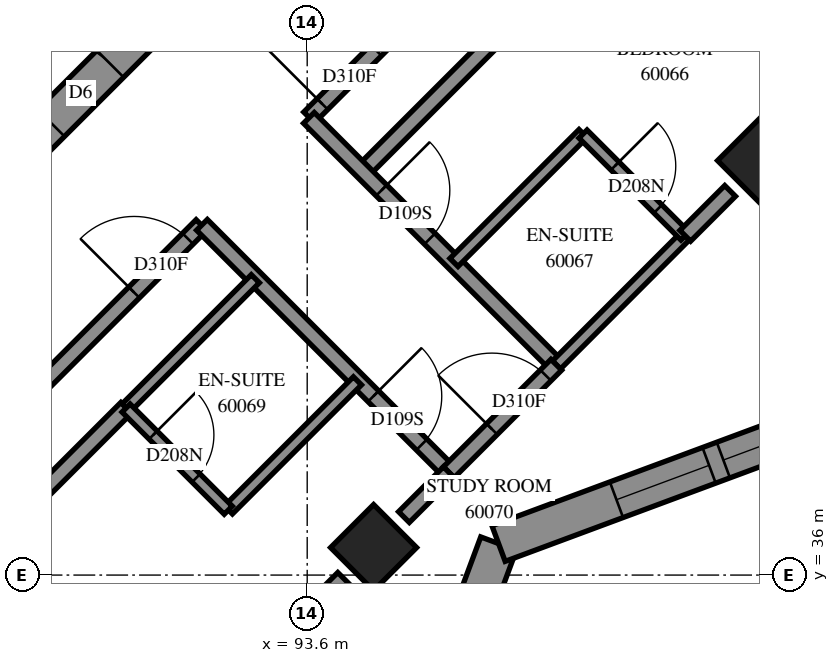
"""IFC4 building model, lengths in metres.
Left out: names, types, materials, properties, quantities, classifications, styles, units other than length and angle.
Written with IfcOpenShell. Run it as: python <this file> out.ifc"""

import sys

from ifc_helpers import new_model, si_unit, direction, frame, frame_2d, origin, origin_2d, place, context, subcontext, project, spatial, polyline, rectangle, outline, extrude, element, fill, save


model = new_model("IFC4")
c1 = context("Model", 3, precision=1e-05, world=origin(), true_north=direction((0.0, 1.0)))
c2 = subcontext(c1, "Body", "Model", "MODEL_VIEW")
j1 = project(units=[si_unit("LENGTHUNIT", "METRE"), si_unit("PLANEANGLEUNIT", "RADIAN")], contexts=[c1])
p1 = place(None, origin())
s1 = spatial("IfcSite", under=j1, at=p1, CompositionType="ELEMENT")
p2 = place(p1, origin())
s2 = spatial("IfcBuilding", under=s1, at=p2, CompositionType="ELEMENT")
p3 = place(p2, frame((0.0, 0.0, 220.2)))
s3 = spatial("IfcBuildingStorey", under=s2, at=p3, CompositionType="ELEMENT", Elevation=220.2)
for number, where, z_axis, x_axis in (
    (1, (99.565, 41.453, 0.0), (0.0, 0.0, 1.0), (0.707, -0.707, 0.0)),
    (2, (94.474, 36.362, 0.0), (0.0, 0.0, 1.0), (0.707, -0.707, 0.0)),
):
    element("IfcColumn", number, at=place(p3, frame(where, z_axis=z_axis, x_axis=x_axis)), inside=s3, PredefinedType="COLUMN", context=c2, shape_type="SweptSolid", body=[
        extrude(rectangle(XDim=0.8, YDim=0.8, at=origin_2d()), origin(), (0.0, 0.0, 1.0), 3.1),
    ])
p4 = place(p3, frame((87.013, 38.731, -0.3), z_axis=(0.0, 0.0, 1.0), x_axis=(0.7071067812, 0.7071067812, 0.0)))
e3 = element("IfcWall", 3, at=p4, inside=s3, PredefinedType="SHEAR", context=c2, shape_type="SweptSolid", body=[
    extrude(rectangle(XDim=14.4, YDim=0.5, at=frame_2d((7.2, 0.0))), origin(), (0.0, 0.0, 1.0), 2.7),
])
p5 = place(p4, frame((4.55, 0.0, 0.3)))
e4 = element("IfcOpeningElement", 4, at=p5, cuts=e3, PredefinedType="OPENING", context=c2, shape_type="SweptSolid", body=[
    extrude(rectangle(XDim=1.1, YDim=2.1, at=frame_2d((0.55, 1.05))), frame((0.0, 0.26, 0.0), z_axis=(0.0, -1.0, 0.0), x_axis=(1.0, 0.0, 0.0)), (0.0, 0.0, 1.0), 0.52),
])
p6 = place(p4, frame((11.35, 0.0, 0.3)))
e5 = element("IfcOpeningElement", 5, at=p6, cuts=e3, PredefinedType="OPENING", context=c2, shape_type="SweptSolid", body=[
    extrude(rectangle(XDim=1.1, YDim=2.1, at=frame_2d((0.55, 1.05))), frame((0.0, 0.26, 0.0), z_axis=(0.0, -1.0, 0.0), x_axis=(1.0, 0.0, 0.0)), (0.0, 0.0, 1.0), 0.52),
])
p7 = place(p3, frame((94.281, 31.47, 0.0), z_axis=(0.0, 0.0, 1.0), x_axis=(0.3481903374, 0.9374238577, 0.0)))
e6 = element("IfcWall", 6, at=p7, inside=s3, PredefinedType="SOLIDWALL", context=c2, shape_type="SweptSolid", body=[
    extrude(outline(polyline([(-0.12, -0.25), (5.16, -0.25), (5.39, 0.25), (0.12, 0.25), (-0.12, -0.25)])), origin(), (0.0, 0.0, 1.0), 3.1),
])
p8 = place(p7, frame((1.512, 0.0, 0.45)))
e7 = element("IfcOpeningElement", 7, at=p8, cuts=e6, PredefinedType="OPENING", context=c2, shape_type="SweptSolid", body=[
    extrude(rectangle(XDim=1.3, YDim=2.5, at=frame_2d((0.65, 1.25))), frame((0.0, 0.26, 0.0), z_axis=(0.0, -1.0, 0.0), x_axis=(1.0, 0.0, 0.0)), (0.0, 0.0, 1.0), 0.52),
])
p9 = place(p7, frame((3.012, 0.0, 0.45)))
e8 = element("IfcOpeningElement", 8, at=p9, cuts=e6, PredefinedType="OPENING", context=c2, shape_type="SweptSolid", body=[
    extrude(rectangle(XDim=1.3, YDim=2.5, at=frame_2d((0.65, 1.25))), frame((0.0, 0.26, 0.0), z_axis=(0.0, -1.0, 0.0), x_axis=(1.0, 0.0, 0.0)), (0.0, 0.0, 1.0), 0.52),
])
p10 = place(p3, frame((96.118, 36.415, 0.0), z_axis=(0.0, 0.0, 1.0), x_axis=(0.9374238577, 0.3481903374, 0.0)))
e9 = element("IfcWall", 9, at=p10, inside=s3, PredefinedType="SOLIDWALL", context=c2, shape_type="SweptSolid", body=[
    extrude(outline(polyline([(0.115, -0.25), (5.395, -0.25), (5.155, 0.25), (-0.115, 0.25), (0.115, -0.25)])), origin(), (0.0, 0.0, 1.0), 3.1),
])
p11 = place(p10, frame((1.655, 0.0, 0.45)))
e10 = element("IfcOpeningElement", 10, at=p11, cuts=e9, PredefinedType="OPENING", context=c2, shape_type="SweptSolid", body=[
    extrude(rectangle(XDim=1.3, YDim=2.5, at=frame_2d((0.65, 1.25))), frame((0.0, 0.26, 0.0), z_axis=(0.0, -1.0, 0.0), x_axis=(1.0, 0.0, 0.0)), (0.0, 0.0, 1.0), 0.52),
])
p12 = place(p10, frame((3.155, 0.0, 0.45)))
e11 = element("IfcOpeningElement", 11, at=p12, cuts=e9, PredefinedType="OPENING", context=c2, shape_type="SweptSolid", body=[
    extrude(rectangle(XDim=1.3, YDim=2.5, at=frame_2d((0.65, 1.25))), frame((0.0, 0.26, 0.0), z_axis=(0.0, -1.0, 0.0), x_axis=(1.0, 0.0, 0.0)), (0.0, 0.0, 1.0), 0.52),
])
p13 = place(p3, frame((93.625, 42.021, 0.0), z_axis=(0.0, 0.0, 1.0), x_axis=(0.7071067812, 0.7071067812, 0.0)))
e12 = element("IfcWall", 12, at=p13, inside=s3, PredefinedType="PARTITIONING", context=c2, shape_type="SweptSolid", body=[
    extrude(rectangle(XDim=9.998, YDim=0.2, at=frame_2d((4.999, 0.0))), origin(), (0.0, 0.0, 1.0), 3.1),
])
p14 = place(p13, frame((0.248, 0.0, 0.0)))
e13 = element("IfcOpeningElement", 13, at=p14, cuts=e12, PredefinedType="OPENING", context=c2, shape_type="SweptSolid", body=[
    extrude(rectangle(XDim=1.0, YDim=2.1, at=frame_2d((0.5, 1.05))), frame((0.0, 0.11, 0.0), z_axis=(0.0, -1.0, 0.0), x_axis=(1.0, 0.0, 0.0)), (0.0, 0.0, 1.0), 0.22),
])
p15 = place(p3, frame((85.016, 31.997, 0.0), z_axis=(0.0, 0.0, 1.0), x_axis=(0.7071067812, 0.7071067812, 0.0)))
e14 = element("IfcWall", 14, at=p15, inside=s3, PredefinedType="PARTITIONING", context=c2, shape_type="SweptSolid", body=[
    extrude(rectangle(XDim=8.773, YDim=0.2, at=frame_2d((4.387, 0.0))), origin(), (0.0, 0.0, 1.0), 3.1),
])
p16 = place(p3, frame((86.835, 35.231, 0.0), z_axis=(0.0, 0.0, 1.0), x_axis=(0.7071067812, 0.7071067812, 0.0)))
e15 = element("IfcWall", 15, at=p16, inside=s3, PredefinedType="PARTITIONING", context=c2, shape_type="SweptSolid", body=[
    extrude(rectangle(XDim=7.6, YDim=0.2, at=frame_2d((3.8, 0.0))), origin(), (0.0, 0.0, 1.0), 3.1),
])
p17 = place(p16, frame((6.346, 0.0, 0.0)))
e16 = element("IfcOpeningElement", 16, at=p17, cuts=e15, PredefinedType="OPENING", context=c2, shape_type="SweptSolid", body=[
    extrude(rectangle(XDim=1.0, YDim=2.1, at=frame_2d((0.5, 1.05))), frame((0.0, 0.11, 0.0), z_axis=(0.0, -1.0, 0.0), x_axis=(1.0, 0.0, 0.0)), (0.0, 0.0, 1.0), 0.22),
])
p18 = place(p3, frame((94.331, 41.313, 0.0), z_axis=(0.0, 0.0, 1.0), x_axis=(0.7072516979, 0.7069618347, 0.0)))
e17 = element("IfcWall", 17, at=p18, inside=s3, PredefinedType="PARTITIONING", context=c2, shape_type="SweptSolid", body=[
    extrude(rectangle(XDim=6.9, YDim=0.2, at=frame_2d((3.45, 0.0))), origin(), (0.0, 0.0, 1.0), 3.1),
])
p19 = place(p3, frame((89.781, 31.671, 0.0), z_axis=(0.0, 0.0, 1.0), x_axis=(0.7071067812, 0.7071067812, 0.0)))
e18 = element("IfcWall", 18, at=p19, inside=s3, PredefinedType="PARTITIONING", context=c2, shape_type="SweptSolid", body=[
    extrude(rectangle(XDim=6.07, YDim=0.2, at=frame_2d((3.035, 0.0))), origin(), (0.0, 0.0, 1.0), 2.6),
])
p20 = place(p3, frame((93.623, 42.015, 0.0), z_axis=(0.0, 0.0, 1.0), x_axis=(0.7071067812, -0.7071067812, 0.0)))
e19 = element("IfcWall", 19, at=p20, inside=s3, PredefinedType="PARTITIONING", context=c2, shape_type="SweptSolid", body=[
    extrude(rectangle(XDim=4.599, YDim=0.2, at=frame_2d((2.3, 0.0))), origin(), (0.0, 0.0, 1.0), 3.1),
])
p21 = place(p20, frame((1.349, 0.0, 0.0)))
e20 = element("IfcOpeningElement", 20, at=p21, cuts=e19, PredefinedType="OPENING", context=c2, shape_type="SweptSolid", body=[
    extrude(rectangle(XDim=0.9, YDim=2.1, at=frame_2d((0.45, 1.05))), frame((0.0, 0.11, 0.0), z_axis=(0.0, -1.0, 0.0), x_axis=(1.0, 0.0, 0.0)), (0.0, 0.0, 1.0), 0.22),
])
p22 = place(p3, frame((92.216, 40.608, 0.0), z_axis=(0.0, 0.0, 1.0), x_axis=(0.7071067812, -0.7071067812, 0.0)))
e21 = element("IfcWall", 21, at=p22, inside=s3, PredefinedType="PARTITIONING", context=c2, shape_type="SweptSolid", body=[
    extrude(rectangle(XDim=4.599, YDim=0.2, at=frame_2d((2.3, 0.0))), origin(), (0.0, 0.0, 1.0), 3.1),
])
p23 = place(p22, frame((3.189, 0.0, 0.0)))
e22 = element("IfcOpeningElement", 22, at=p23, cuts=e21, PredefinedType="OPENING", context=c2, shape_type="SweptSolid", body=[
    extrude(rectangle(XDim=0.9, YDim=2.1, at=frame_2d((0.45, 1.05))), frame((0.0, 0.11, 0.0), z_axis=(0.0, -1.0, 0.0), x_axis=(1.0, 0.0, 0.0)), (0.0, 0.0, 1.0), 0.22),
])
for number, where, z_axis, x_axis in (
    (23, (92.563, 36.857, 0.0), (0.0, 0.0, 1.0), (0.707, 0.707, 0.0)),
    (24, (91.219, 38.201, 0.0), (0.0, 0.0, 1.0), (0.707, 0.707, 0.0)),
):
    element("IfcWall", number, at=place(p3, frame(where, z_axis=z_axis, x_axis=x_axis)), inside=s3, PredefinedType="PARTITIONING", context=c2, shape_type="SweptSolid", body=[
        extrude(rectangle(XDim=2.401, YDim=0.15, at=frame_2d((1.201, 0.0))), origin(), (0.0, 0.0, 1.0), 3.1),
    ])
p24 = place(p3, frame((96.879, 38.764, 0.0), z_axis=(0.0, 0.0, 1.0), x_axis=(0.706689978, 0.7075233388, 0.0)))
e25 = element("IfcWall", 25, at=p24, inside=s3, PredefinedType="PARTITIONING", context=c2, shape_type="SweptSolid", body=[
    extrude(rectangle(XDim=2.4, YDim=0.15, at=frame_2d((1.2, 0.0))), origin(), (0.0, 0.0, 1.0), 2.6),
])
p25 = place(p3, frame((95.531, 40.113, 0.0), z_axis=(0.0, 0.0, 1.0), x_axis=(0.7075233388, 0.706689978, 0.0)))
e26 = element("IfcWall", 26, at=p25, inside=s3, PredefinedType="PARTITIONING", context=c2, shape_type="SweptSolid", body=[
    extrude(rectangle(XDim=2.4, YDim=0.15, at=frame_2d((1.2, 0.0))), origin(), (0.0, 0.0, 1.0), 3.1),
])
p26 = place(p3, frame((95.463, 37.353, 0.0), z_axis=(0.0, 0.0, 1.0), x_axis=(0.7071067812, 0.7071067812, 0.0)))
e27 = element("IfcWall", 27, at=p26, inside=s3, PredefinedType="PARTITIONING", context=c2, shape_type="SweptSolid", body=[
    extrude(rectangle(XDim=2.0, YDim=0.2, at=frame_2d((1.0, 0.0))), origin(), (0.0, 0.0, 1.0), 2.6),
])
p27 = place(p26, frame((0.802, 0.0, 0.0)))
e28 = element("IfcOpeningElement", 28, at=p27, cuts=e27, PredefinedType="OPENING", context=c2, shape_type="SweptSolid", body=[
    extrude(rectangle(XDim=1.0, YDim=2.1, at=frame_2d((0.5, 1.05))), frame((0.0, 0.11, 0.0), z_axis=(0.0, -1.0, 0.0), x_axis=(1.0, 0.0, 0.0)), (0.0, 0.0, 1.0), 0.22),
])
p28 = place(p3, frame((91.217, 38.197, 0.0), z_axis=(0.0, 0.0, 1.0), x_axis=(0.7071067812, -0.7071067812, 0.0)))
e29 = element("IfcWall", 29, at=p28, inside=s3, PredefinedType="PARTITIONING", context=c2, shape_type="SweptSolid", body=[
    extrude(rectangle(XDim=1.901, YDim=0.15, at=frame_2d((0.95, 0.0))), origin(), (0.0, 0.0, 1.0), 3.1),
])
p29 = place(p28, frame((0.502, 0.0, 0.0)))
e30 = element("IfcOpeningElement", 30, at=p29, cuts=e29, PredefinedType="OPENING", context=c2, shape_type="SweptSolid", body=[
    extrude(rectangle(XDim=0.8, YDim=2.1, at=frame_2d((0.4, 1.05))), frame((0.0, 0.085, 0.0), z_axis=(0.0, -1.0, 0.0), x_axis=(1.0, 0.0, 0.0)), (0.0, 0.0, 1.0), 0.17),
])
p30 = place(p3, frame((97.229, 41.803, 0.0), z_axis=(0.0, 0.0, 1.0), x_axis=(0.7071067812, -0.7071067812, 0.0)))
e31 = element("IfcWall", 31, at=p30, inside=s3, PredefinedType="PARTITIONING", context=c2, shape_type="SweptSolid", body=[
    extrude(rectangle(XDim=1.898, YDim=0.15, at=frame_2d((0.949, 0.0))), origin(), (0.0, 0.0, 1.0), 3.1),
])
p31 = place(p30, frame((0.594, 0.0, 0.0)))
e32 = element("IfcOpeningElement", 32, at=p31, cuts=e31, PredefinedType="OPENING", context=c2, shape_type="SweptSolid", body=[
    extrude(rectangle(XDim=0.8, YDim=2.1, at=frame_2d((0.4, 1.05))), frame((0.0, 0.085, 0.0), z_axis=(0.0, -1.0, 0.0), x_axis=(1.0, 0.0, 0.0)), (0.0, 0.0, 1.0), 0.17),
])
for number, where, z_axis, x_axis in (
    (33, (98.574, 40.464, 0.0), (0.0, 0.0, 1.0), (0.707, 0.707, 0.0)),
    (34, (94.873, 36.763, 0.0), (0.0, 0.0, 1.0), (0.707, 0.707, 0.0)),
):
    element("IfcWall", number, at=place(p3, frame(where, z_axis=z_axis, x_axis=x_axis)), inside=s3, PredefinedType="PARTITIONING", context=c2, shape_type="SweptSolid", body=[
        extrude(rectangle(XDim=0.834, YDim=0.2, at=frame_2d((0.417, 0.0))), origin(), (0.0, 0.0, 1.0), 2.6),
    ])
p32 = place(p11, origin())
e35 = element("IfcWindow", 35, at=p32, inside=s3, PartitioningType="SINGLE_PANEL", PredefinedType="WINDOW", context=c2, shape_type="SweptSolid", body=[
    extrude(rectangle(XDim=1.3, YDim=2.5, at=frame_2d((0.65, 1.25))), frame((0.0, 0.18, 0.0), z_axis=(0.0, -1.0, 0.0), x_axis=(1.0, 0.0, 0.0)), (0.0, 0.0, 1.0), 0.06),
])
fill(e10, e35)
p33 = place(p12, origin())
e36 = element("IfcWindow", 36, at=p33, inside=s3, PartitioningType="SINGLE_PANEL", PredefinedType="WINDOW", context=c2, shape_type="SweptSolid", body=[
    extrude(rectangle(XDim=1.3, YDim=2.5, at=frame_2d((0.65, 1.25))), frame((0.0, 0.18, 0.0), z_axis=(0.0, -1.0, 0.0), x_axis=(1.0, 0.0, 0.0)), (0.0, 0.0, 1.0), 0.06),
])
fill(e11, e36)
p34 = place(p5, origin())
e37 = element("IfcDoor", 37, at=p34, inside=s3, OperationType="DOUBLE_DOOR_SINGLE_SWING", PredefinedType="DOOR", context=c2, shape_type="SweptSolid", body=[
    extrude(rectangle(XDim=1.1, YDim=2.1, at=frame_2d((0.55, 1.05))), frame((0.0, 0.025, 0.0), z_axis=(0.0, -1.0, 0.0), x_axis=(1.0, 0.0, 0.0)), (0.0, 0.0, 1.0), 0.05),
])
fill(e4, e37)
p35 = place(p14, origin())
e38 = element("IfcDoor", 38, at=p35, inside=s3, OperationType="SINGLE_SWING_LEFT", PredefinedType="DOOR", context=c2, shape_type="SweptSolid", body=[
    extrude(rectangle(XDim=1.0, YDim=2.1, at=frame_2d((0.5, 1.05))), frame((0.0, 0.025, 0.0), z_axis=(0.0, -1.0, 0.0), x_axis=(1.0, 0.0, 0.0)), (0.0, 0.0, 1.0), 0.05),
])
fill(e13, e38)
p36 = place(p17, origin())
e39 = element("IfcDoor", 39, at=p36, inside=s3, OperationType="SINGLE_SWING_RIGHT", PredefinedType="DOOR", context=c2, shape_type="SweptSolid", body=[
    extrude(rectangle(XDim=1.0, YDim=2.1, at=frame_2d((0.5, 1.05))), frame((0.0, 0.025, 0.0), z_axis=(0.0, -1.0, 0.0), x_axis=(1.0, 0.0, 0.0)), (0.0, 0.0, 1.0), 0.05),
])
fill(e16, e39)
p37 = place(p21, origin())
e40 = element("IfcDoor", 40, at=p37, inside=s3, OperationType="SINGLE_SWING_RIGHT", PredefinedType="DOOR", context=c2, shape_type="SweptSolid", body=[
    extrude(rectangle(XDim=0.9, YDim=2.1, at=frame_2d((0.45, 1.05))), frame((0.0, 0.025, 0.0), z_axis=(0.0, -1.0, 0.0), x_axis=(1.0, 0.0, 0.0)), (0.0, 0.0, 1.0), 0.05),
])
fill(e20, e40)
p38 = place(p31, origin())
e41 = element("IfcDoor", 41, at=p38, inside=s3, OperationType="SINGLE_SWING_RIGHT", PredefinedType="DOOR", context=c2, shape_type="SweptSolid", body=[
    extrude(rectangle(XDim=0.8, YDim=2.1, at=frame_2d((0.4, 1.05))), frame((0.0, 0.025, 0.0), z_axis=(0.0, -1.0, 0.0), x_axis=(1.0, 0.0, 0.0)), (0.0, 0.0, 1.0), 0.05),
])
fill(e32, e41)
p39 = place(p23, origin())
e42 = element("IfcDoor", 42, at=p39, inside=s3, OperationType="SINGLE_SWING_LEFT", PredefinedType="DOOR", context=c2, shape_type="SweptSolid", body=[
    extrude(rectangle(XDim=0.9, YDim=2.1, at=frame_2d((0.45, 1.05))), frame((0.0, 0.025, 0.0), z_axis=(0.0, -1.0, 0.0), x_axis=(1.0, 0.0, 0.0)), (0.0, 0.0, 1.0), 0.05),
])
fill(e22, e42)
p40 = place(p29, origin())
e43 = element("IfcDoor", 43, at=p40, inside=s3, OperationType="SINGLE_SWING_RIGHT", PredefinedType="DOOR", context=c2, shape_type="SweptSolid", body=[
    extrude(rectangle(XDim=0.8, YDim=2.1, at=frame_2d((0.4, 1.05))), frame((0.0, 0.025, 0.0), z_axis=(0.0, -1.0, 0.0), x_axis=(1.0, 0.0, 0.0)), (0.0, 0.0, 1.0), 0.05),
])
fill(e30, e43)
p41 = place(p27, origin())
e44 = element("IfcDoor", 44, at=p41, inside=s3, OperationType="SINGLE_SWING_RIGHT", PredefinedType="DOOR", context=c2, shape_type="SweptSolid", body=[
    extrude(rectangle(XDim=1.0, YDim=2.1, at=frame_2d((0.5, 1.05))), frame((0.0, 0.025, 0.0), z_axis=(0.0, -1.0, 0.0), x_axis=(1.0, 0.0, 0.0)), (0.0, 0.0, 1.0), 0.05),
])
fill(e28, e44)
save(model, sys.argv[1])
